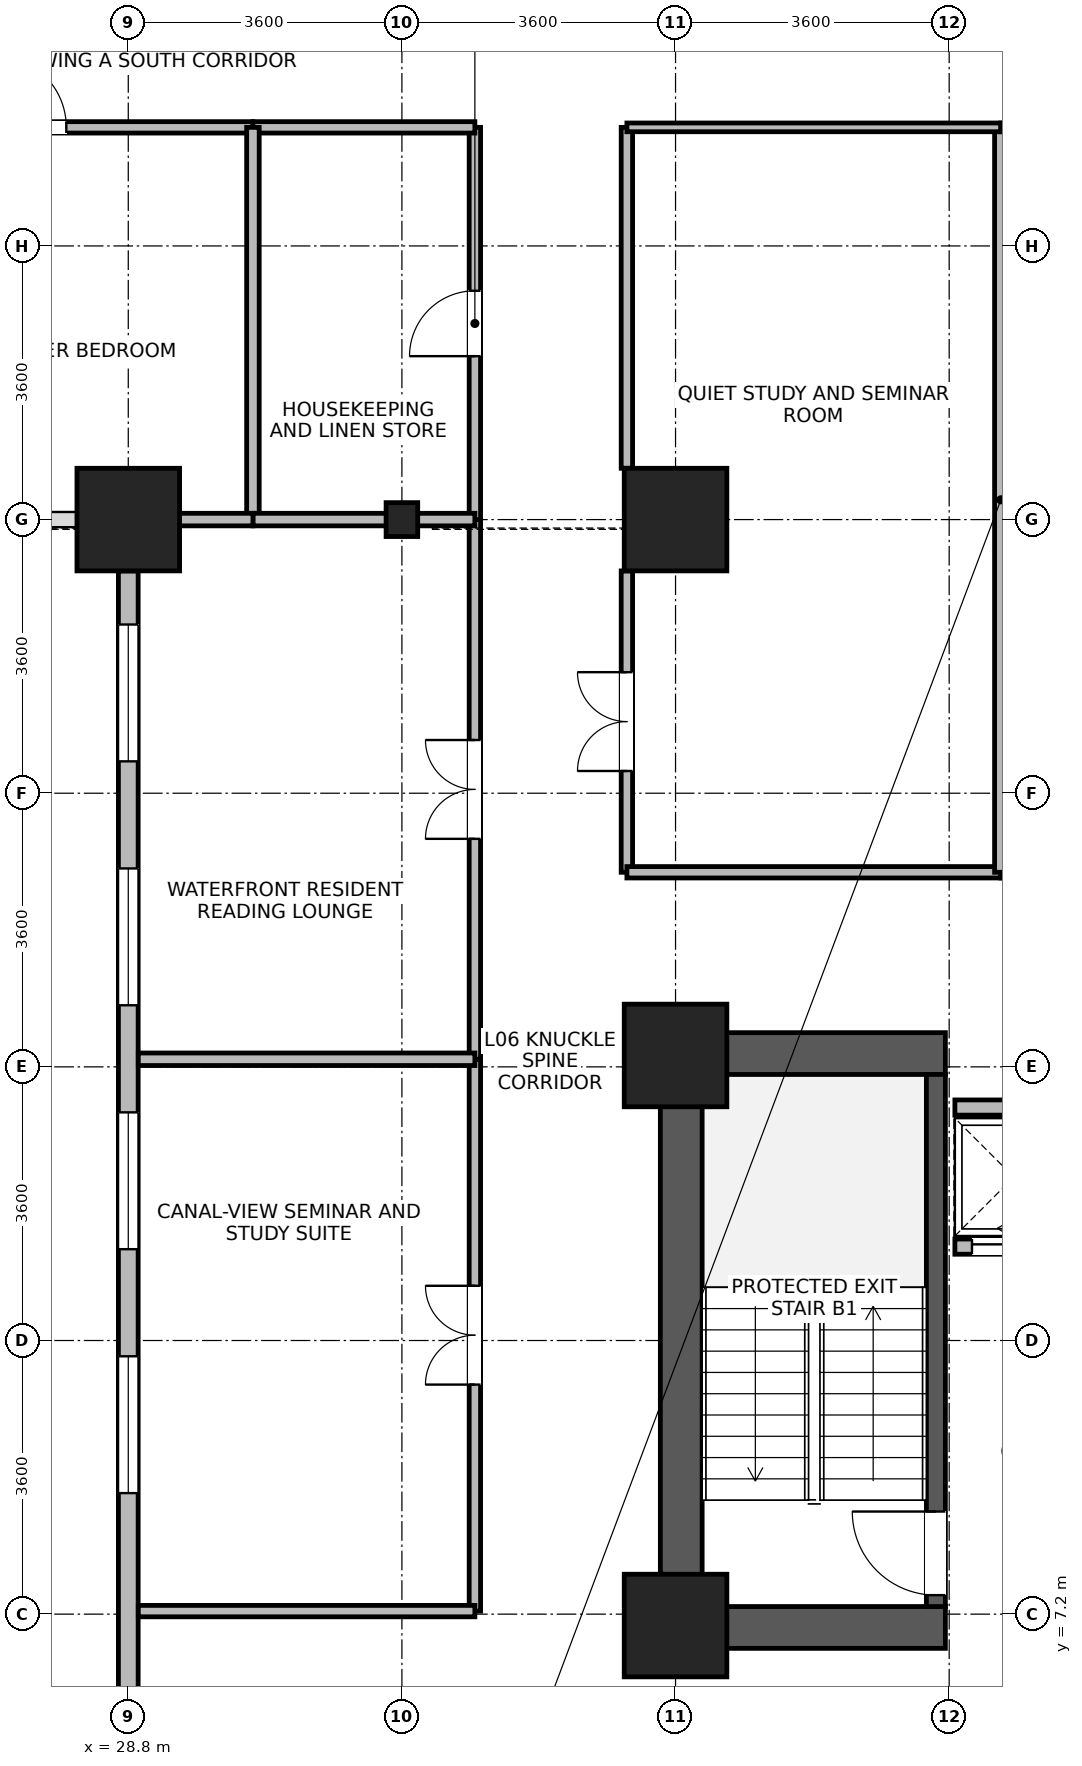
"""IFC4 building model, lengths in metres.
Left out: names, types, materials, properties, quantities, classifications, styles, units other than length and angle.
Written with IfcOpenShell. Run it as: python <this file> out.ifc"""

import sys

from ifc_helpers import new_model, si_unit, direction, frame, frame_2d, origin, origin_2d, place, context, subcontext, project, spatial, rectangle, i_section, extrude, source, transform, mapped, element, fill, save


model = new_model("IFC4")
c1 = context("Model", 3, precision=1e-05, world=origin(), true_north=direction((0.0, 1.0)))
c2 = subcontext(c1, "Body", "Model", "MODEL_VIEW")
j1 = project(units=[si_unit("LENGTHUNIT", "METRE"), si_unit("PLANEANGLEUNIT", "RADIAN")], contexts=[c1])
p1 = place(None, origin())
s1 = spatial("IfcSite", under=j1, at=p1, CompositionType="ELEMENT")
p2 = place(p1, origin())
s2 = spatial("IfcBuilding", under=s1, at=p2, CompositionType="ELEMENT")
p3 = place(p2, frame((0.0, 0.0, 29.0)))
s3 = spatial("IfcBuildingStorey", under=s2, at=p3, CompositionType="ELEMENT", Elevation=29.0)
p4 = place(p3, frame((36.075, 6.75, 0.0), z_axis=(0.0, 0.0, 1.0), x_axis=(0.0, 1.0, 0.0)))
e1 = element("IfcWall", 1, at=p4, inside=s3, PredefinedType="SHEAR", context=c2, shape_type="SweptSolid", body=[
    extrude(rectangle(XDim=8.1, YDim=0.55, at=frame_2d((4.05, 0.0))), origin(), (0.0, 0.0, 1.0), 3.45),
])
for number, where, z_axis, x_axis in (
    (2, (36.35, 7.025, 0.0), (0.0, 0.0, 1.0), (1.0, 0.0, 0.0)),
    (3, (36.35, 14.575, 0.0), (0.0, 0.0, 1.0), (1.0, 0.0, 0.0)),
):
    element("IfcWall", number, at=place(p3, frame(where, z_axis=z_axis, x_axis=x_axis)), inside=s3, PredefinedType="SHEAR", context=c2, shape_type="SweptSolid", body=[
        extrude(rectangle(XDim=3.2, YDim=0.55, at=frame_2d((1.6, 0.0))), origin(), (0.0, 0.0, 1.0), 3.45),
    ])
p5 = place(p3, frame((39.425, 7.3, 0.0), z_axis=(0.0, 0.0, 1.0), x_axis=(0.0, 1.0, 0.0)))
e4 = element("IfcWall", 4, at=p5, inside=s3, PredefinedType="SHEAR", context=c2, shape_type="SweptSolid", body=[
    extrude(rectangle(XDim=7.0, YDim=0.25, at=frame_2d((3.5, 0.0))), origin(), (0.0, 0.0, 1.0), 3.45),
])
p6 = place(p5, frame((0.15, 0.0, 0.0)))
e5 = element("IfcOpeningElement", 5, at=p6, cuts=e4, PredefinedType="OPENING", context=c2, shape_type="SweptSolid", body=[
    extrude(rectangle(XDim=1.1, YDim=2.08, at=frame_2d((0.55, 1.04))), frame((0.0, 0.135, 0.0), z_axis=(0.0, -1.0, 0.0), x_axis=(1.0, 0.0, 0.0)), (0.0, 0.0, 1.0), 0.27),
])
m1 = source(origin(), c2, "Body", "SweptSolid", [
    extrude(rectangle(XDim=1.35, YDim=1.35, at=origin_2d()), origin(), (0.0, 0.0, 1.0), 3.7),
])
for number, where, z_axis, x_axis in (
    (6, (28.8, 21.6, 0.0), (0.0, 0.0, 1.0), (1.0, 0.0, 0.0)),
    (7, (36.0, 21.6, 0.0), (0.0, 0.0, 1.0), (1.0, 0.0, 0.0)),
    (8, (36.0, 7.05, 0.0), (0.0, 0.0, 1.0), (1.0, 0.0, 0.0)),
    (9, (36.0, 14.55, 0.0), (0.0, 0.0, 1.0), (1.0, 0.0, 0.0)),
):
    element("IfcColumn", number, at=place(p3, frame(where, z_axis=z_axis, x_axis=x_axis)), inside=s3, PredefinedType="COLUMN", context=c2, shape_type="MappedRepresentation", body=[
        mapped(m1, transform((0.0, 0.0, 0.0), x_axis=(1.0, 0.0, 0.0), y_axis=(0.0, 1.0, 0.0), z_axis=(0.0, 0.0, 1.0), scale=1.0)),
    ])
m2 = source(origin(), c2, "Body", "SweptSolid", [
    extrude(i_section(OverallWidth=0.416, OverallDepth=0.446, WebThickness=0.029, FlangeThickness=0.04, FilletRadius=0.015, at=origin_2d()), origin(), (0.0, 0.0, 1.0), 3.7),
])
p7 = place(p3, frame((32.4, 21.6, 0.0), z_axis=(0.0, 0.0, 1.0), x_axis=(1.0, 0.0, 0.0)))
e10 = element("IfcColumn", 10, at=p7, inside=s3, PredefinedType="COLUMN", context=c2, shape_type="MappedRepresentation", body=[
    mapped(m2, transform((0.0, 0.0, 0.0), x_axis=(1.0, 0.0, 0.0), y_axis=(0.0, 1.0, 0.0), z_axis=(0.0, 0.0, 1.0), scale=1.0)),
])
p8 = place(p3, frame((28.8, 1.67, 0.0), z_axis=(0.0, 0.0, 1.0), x_axis=(0.0, 1.0, 0.0)))
e11 = element("IfcWall", 11, at=p8, inside=s3, PredefinedType="STANDARD", context=c2, shape_type="SweptSolid", body=[
    extrude(rectangle(XDim=19.254, YDim=0.26, at=frame_2d((9.627, 0.0))), origin(), (0.0, 0.0, 1.0), 3.43),
])
p9 = place(p8, frame((0.705, 0.0, 0.85)))
e12 = element("IfcOpeningElement", 12, at=p9, cuts=e11, PredefinedType="OPENING", context=c2, shape_type="SweptSolid", body=[
    extrude(rectangle(XDim=1.8, YDim=1.85, at=frame_2d((0.9, 0.925))), frame((0.0, 0.14, 0.0), z_axis=(0.0, -1.0, 0.0), x_axis=(1.0, 0.0, 0.0)), (0.0, 0.0, 1.0), 0.28),
])
p10 = place(p8, frame((7.123, 0.0, 0.85)))
e13 = element("IfcOpeningElement", 13, at=p10, cuts=e11, PredefinedType="OPENING", context=c2, shape_type="SweptSolid", body=[
    extrude(rectangle(XDim=1.8, YDim=1.85, at=frame_2d((0.9, 0.925))), frame((0.0, 0.14, 0.0), z_axis=(0.0, -1.0, 0.0), x_axis=(1.0, 0.0, 0.0)), (0.0, 0.0, 1.0), 0.28),
])
p11 = place(p8, frame((10.332, 0.0, 0.85)))
e14 = element("IfcOpeningElement", 14, at=p11, cuts=e11, PredefinedType="OPENING", context=c2, shape_type="SweptSolid", body=[
    extrude(rectangle(XDim=1.8, YDim=1.85, at=frame_2d((0.9, 0.925))), frame((0.0, 0.14, 0.0), z_axis=(0.0, -1.0, 0.0), x_axis=(1.0, 0.0, 0.0)), (0.0, 0.0, 1.0), 0.28),
])
p12 = place(p8, frame((13.541, 0.0, 0.85)))
e15 = element("IfcOpeningElement", 15, at=p12, cuts=e11, PredefinedType="OPENING", context=c2, shape_type="SweptSolid", body=[
    extrude(rectangle(XDim=1.8, YDim=1.85, at=frame_2d((0.9, 0.925))), frame((0.0, 0.14, 0.0), z_axis=(0.0, -1.0, 0.0), x_axis=(1.0, 0.0, 0.0)), (0.0, 0.0, 1.0), 0.28),
])
p13 = place(p8, frame((16.75, 0.0, 0.85)))
e16 = element("IfcOpeningElement", 16, at=p13, cuts=e11, PredefinedType="OPENING", context=c2, shape_type="SweptSolid", body=[
    extrude(rectangle(XDim=1.8, YDim=1.85, at=frame_2d((0.9, 0.925))), frame((0.0, 0.14, 0.0), z_axis=(0.0, -1.0, 0.0), x_axis=(1.0, 0.0, 0.0)), (0.0, 0.0, 1.0), 0.28),
])
p14 = place(p3, frame((39.675, 12.035, 0.0), z_axis=(0.0, 0.0, 1.0), x_axis=(1.0, 0.0, 0.0)))
e17 = element("IfcWall", 17, at=p14, inside=s3, PredefinedType="PARTITIONING", context=c2, shape_type="SweptSolid", body=[
    extrude(rectangle(XDim=1.55, YDim=0.2, at=frame_2d((0.775, 0.0))), origin(), (0.0, 0.0, 1.0), 3.43),
])
p15 = place(p14, frame((0.225, 0.0, 0.0)))
e18 = element("IfcOpeningElement", 18, at=p15, cuts=e17, PredefinedType="OPENING", context=c2, shape_type="SweptSolid", body=[
    extrude(rectangle(XDim=1.1, YDim=2.12, at=frame_2d((0.55, 1.06))), frame((0.0, 0.11, 0.0), z_axis=(0.0, -1.0, 0.0), x_axis=(1.0, 0.0, 0.0)), (0.0, 0.0, 1.0), 0.22),
])
p16 = place(p3, frame((39.675, 13.865, 0.0), z_axis=(0.0, 0.0, 1.0), x_axis=(1.0, 0.0, 0.0)))
e19 = element("IfcWall", 19, at=p16, inside=s3, PredefinedType="PARTITIONING", context=c2, shape_type="SweptSolid", body=[
    extrude(rectangle(XDim=1.55, YDim=0.2, at=frame_2d((0.775, 0.0))), origin(), (0.0, 0.0, 1.0), 3.43),
])
p17 = place(p3, frame((35.36, 16.96, 0.0), z_axis=(0.0, 0.0, 1.0), x_axis=(0.0, 1.0, 0.0)))
e20 = element("IfcWall", 20, at=p17, inside=s3, PredefinedType="PARTITIONING", context=c2, shape_type="SweptSolid", body=[
    extrude(rectangle(XDim=3.965, YDim=0.15, at=frame_2d((1.982, 0.0))), origin(), (0.0, 0.0, 1.0), 3.43),
])
p18 = place(p17, frame((1.333, 0.0, 0.0)))
e21 = element("IfcOpeningElement", 21, at=p18, cuts=e20, PredefinedType="OPENING", context=c2, shape_type="SweptSolid", body=[
    extrude(rectangle(XDim=1.3, YDim=2.12, at=frame_2d((0.65, 1.06))), frame((0.0, 0.085, 0.0), z_axis=(0.0, -1.0, 0.0), x_axis=(1.0, 0.0, 0.0)), (0.0, 0.0, 1.0), 0.17),
])
p19 = place(p3, frame((35.36, 22.275, 0.0), z_axis=(0.0, 0.0, 1.0), x_axis=(0.0, 1.0, 0.0)))
e22 = element("IfcWall", 22, at=p19, inside=s3, PredefinedType="PARTITIONING", context=c2, shape_type="SweptSolid", body=[
    extrude(rectangle(XDim=4.485, YDim=0.15, at=frame_2d((2.243, 0.0))), origin(), (0.0, 0.0, 1.0), 3.43),
])
p20 = place(p3, frame((33.36, 7.24, 0.0), z_axis=(0.0, 0.0, 1.0), x_axis=(0.0, 1.0, 0.0)))
e23 = element("IfcWall", 23, at=p20, inside=s3, PredefinedType="PARTITIONING", context=c2, shape_type="SweptSolid", body=[
    extrude(rectangle(XDim=7.26, YDim=0.15, at=frame_2d((3.63, 0.0))), origin(), (0.0, 0.0, 1.0), 3.43),
])
p21 = place(p20, frame((2.98, 0.0, 0.0)))
e24 = element("IfcOpeningElement", 24, at=p21, cuts=e23, PredefinedType="OPENING", context=c2, shape_type="SweptSolid", body=[
    extrude(rectangle(XDim=1.3, YDim=2.12, at=frame_2d((0.65, 1.06))), frame((0.0, 0.085, 0.0), z_axis=(0.0, -1.0, 0.0), x_axis=(1.0, 0.0, 0.0)), (0.0, 0.0, 1.0), 0.17),
])
p22 = place(p3, frame((33.36, 14.5, 0.0), z_axis=(0.0, 0.0, 1.0), x_axis=(0.0, 1.0, 0.0)))
e25 = element("IfcWall", 25, at=p22, inside=s3, PredefinedType="PARTITIONING", context=c2, shape_type="SweptSolid", body=[
    extrude(rectangle(XDim=7.1, YDim=0.15, at=frame_2d((3.55, 0.0))), origin(), (0.0, 0.0, 1.0), 3.43),
])
p23 = place(p22, frame((2.9, 0.0, 0.0)))
e26 = element("IfcOpeningElement", 26, at=p23, cuts=e25, PredefinedType="OPENING", context=c2, shape_type="SweptSolid", body=[
    extrude(rectangle(XDim=1.3, YDim=2.12, at=frame_2d((0.65, 1.06))), frame((0.0, 0.085, 0.0), z_axis=(0.0, -1.0, 0.0), x_axis=(1.0, 0.0, 0.0)), (0.0, 0.0, 1.0), 0.17),
])
p24 = place(p3, frame((24.58, 26.76, 0.0), z_axis=(0.0, 0.0, 1.0), x_axis=(1.0, 0.0, 0.0)))
e27 = element("IfcWall", 27, at=p24, inside=s3, PredefinedType="PARTITIONING", context=c2, shape_type="SweptSolid", body=[
    extrude(rectangle(XDim=5.86, YDim=0.15, at=frame_2d((2.93, 0.0))), origin(), (0.0, 0.0, 1.0), 3.43),
])
p25 = place(p24, frame((2.455, 0.0, 0.0)))
e28 = element("IfcOpeningElement", 28, at=p25, cuts=e27, PredefinedType="OPENING", context=c2, shape_type="SweptSolid", body=[
    extrude(rectangle(XDim=0.95, YDim=2.1, at=frame_2d((0.475, 1.05))), frame((0.0, 0.085, 0.0), z_axis=(0.0, -1.0, 0.0), x_axis=(1.0, 0.0, 0.0)), (0.0, 0.0, 1.0), 0.17),
])
p26 = place(p3, frame((33.36, 21.6, 0.0), z_axis=(0.0, 0.0, 1.0), x_axis=(0.0, 1.0, 0.0)))
e29 = element("IfcWall", 29, at=p26, inside=s3, PredefinedType="PARTITIONING", context=c2, shape_type="SweptSolid", body=[
    extrude(rectangle(XDim=5.16, YDim=0.15, at=frame_2d((2.58, 0.0))), origin(), (0.0, 0.0, 1.0), 3.43),
])
p27 = place(p26, frame((2.15, 0.0, 0.0)))
e30 = element("IfcOpeningElement", 30, at=p27, cuts=e29, PredefinedType="OPENING", context=c2, shape_type="SweptSolid", body=[
    extrude(rectangle(XDim=0.86, YDim=2.02, at=frame_2d((0.43, 1.01))), frame((0.0, 0.085, 0.0), z_axis=(0.0, -1.0, 0.0), x_axis=(1.0, 0.0, 0.0)), (0.0, 0.0, 1.0), 0.17),
])
p28 = place(p3, frame((35.36, 16.96, 0.0), z_axis=(0.0, 0.0, 1.0), x_axis=(1.0, 0.0, 0.0)))
e31 = element("IfcWall", 31, at=p28, inside=s3, PredefinedType="PARTITIONING", context=c2, shape_type="SweptSolid", body=[
    extrude(rectangle(XDim=4.92, YDim=0.15, at=frame_2d((2.46, 0.0))), origin(), (0.0, 0.0, 1.0), 3.43),
])
p29 = place(p3, frame((28.932, 7.24, 0.0), z_axis=(0.0, 0.0, 1.0), x_axis=(1.0, 0.0, 0.0)))
e32 = element("IfcWall", 32, at=p29, inside=s3, PredefinedType="PARTITIONING", context=c2, shape_type="SweptSolid", body=[
    extrude(rectangle(XDim=4.428, YDim=0.15, at=frame_2d((2.214, 0.0))), origin(), (0.0, 0.0, 1.0), 3.43),
])
p30 = place(p3, frame((40.28, 16.96, 0.0), z_axis=(0.0, 0.0, 1.0), x_axis=(1.0, 0.0, 0.0)))
e33 = element("IfcWall", 33, at=p30, inside=s3, PredefinedType="PARTITIONING", context=c2, shape_type="SweptSolid", body=[
    extrude(rectangle(XDim=3.32, YDim=0.15, at=frame_2d((1.66, 0.0))), origin(), (0.0, 0.0, 1.0), 3.43),
])
p31 = place(p30, frame((1.01, 0.0, 0.0)))
e34 = element("IfcOpeningElement", 34, at=p31, cuts=e33, PredefinedType="OPENING", context=c2, shape_type="SweptSolid", body=[
    extrude(rectangle(XDim=1.3, YDim=2.12, at=frame_2d((0.65, 1.06))), frame((0.0, 0.085, 0.0), z_axis=(0.0, -1.0, 0.0), x_axis=(1.0, 0.0, 0.0)), (0.0, 0.0, 1.0), 0.17),
])
p32 = place(p3, frame((30.44, 26.76, 0.0), z_axis=(0.0, 0.0, 1.0), x_axis=(1.0, 0.0, 0.0)))
e35 = element("IfcWall", 35, at=p32, inside=s3, PredefinedType="PARTITIONING", context=c2, shape_type="SweptSolid", body=[
    extrude(rectangle(XDim=2.92, YDim=0.15, at=frame_2d((1.46, 0.0))), origin(), (0.0, 0.0, 1.0), 3.43),
])
p33 = place(p3, frame((40.28, 16.96, 0.0), z_axis=(0.0, 0.0, 1.0), x_axis=(0.0, 1.0, 0.0)))
e36 = element("IfcWall", 36, at=p33, inside=s3, PredefinedType="PARTITIONING", context=c2, shape_type="SweptSolid", body=[
    extrude(rectangle(XDim=9.8, YDim=0.165, at=frame_2d((4.9, 0.0))), origin(), (0.0, 0.0, 1.0), 3.43),
])
p34 = place(p3, frame((30.44, 21.6, 0.0), z_axis=(0.0, 0.0, 1.0), x_axis=(0.0, 1.0, 0.0)))
e37 = element("IfcWall", 37, at=p34, inside=s3, PredefinedType="PARTITIONING", context=c2, shape_type="SweptSolid", body=[
    extrude(rectangle(XDim=5.16, YDim=0.165, at=frame_2d((2.58, 0.0))), origin(), (0.0, 0.0, 1.0), 3.43),
])
p35 = place(p3, frame((35.36, 26.76, 0.0), z_axis=(0.0, 0.0, 1.0), x_axis=(1.0, 0.0, 0.0)))
e38 = element("IfcWall", 38, at=p35, inside=s3, PredefinedType="PARTITIONING", context=c2, shape_type="SweptSolid", body=[
    extrude(rectangle(XDim=4.92, YDim=0.115, at=frame_2d((2.46, 0.0))), origin(), (0.0, 0.0, 1.0), 3.43),
])
p36 = place(p3, frame((28.932, 14.5, 0.0), z_axis=(0.0, 0.0, 1.0), x_axis=(1.0, 0.0, 0.0)))
e39 = element("IfcWall", 39, at=p36, inside=s3, PredefinedType="PARTITIONING", context=c2, shape_type="SweptSolid", body=[
    extrude(rectangle(XDim=4.428, YDim=0.165, at=frame_2d((2.214, 0.0))), origin(), (0.0, 0.0, 1.0), 3.43),
])
p37 = place(p3, frame((40.28, 26.76, 0.0), z_axis=(0.0, 0.0, 1.0), x_axis=(1.0, 0.0, 0.0)))
e40 = element("IfcWall", 40, at=p37, inside=s3, PredefinedType="PARTITIONING", context=c2, shape_type="SweptSolid", body=[
    extrude(rectangle(XDim=3.32, YDim=0.115, at=frame_2d((1.66, 0.0))), origin(), (0.0, 0.0, 1.0), 3.43),
])
p38 = place(p3, frame((30.44, 21.6, 0.0), z_axis=(0.0, 0.0, 1.0), x_axis=(1.0, 0.0, 0.0)))
e41 = element("IfcWall", 41, at=p38, inside=s3, PredefinedType="PARTITIONING", context=c2, shape_type="SweptSolid", body=[
    extrude(rectangle(XDim=2.92, YDim=0.165, at=frame_2d((1.46, 0.0))), origin(), (0.0, 0.0, 1.0), 2.93),
])
p39 = place(p3, frame((28.932, 21.6, 0.0), z_axis=(0.0, 0.0, 1.0), x_axis=(1.0, 0.0, 0.0)))
e42 = element("IfcWall", 42, at=p39, inside=s3, PredefinedType="PARTITIONING", context=c2, shape_type="SweptSolid", body=[
    extrude(rectangle(XDim=1.508, YDim=0.165, at=frame_2d((0.754, 0.0))), origin(), (0.0, 0.0, 1.0), 2.93),
])
p40 = place(p10, origin())
e43 = element("IfcWindow", 43, at=p40, inside=s3, PartitioningType="SINGLE_PANEL", PredefinedType="WINDOW", context=c2, shape_type="SweptSolid", body=[
    extrude(rectangle(XDim=1.8, YDim=1.85, at=frame_2d((0.9, 0.925))), frame((0.0, 0.03, 0.0), z_axis=(0.0, -1.0, 0.0), x_axis=(1.0, 0.0, 0.0)), (0.0, 0.0, 1.0), 0.06),
])
fill(e13, e43)
p41 = place(p11, origin())
e44 = element("IfcWindow", 44, at=p41, inside=s3, PartitioningType="SINGLE_PANEL", PredefinedType="WINDOW", context=c2, shape_type="SweptSolid", body=[
    extrude(rectangle(XDim=1.8, YDim=1.85, at=frame_2d((0.9, 0.925))), frame((0.0, 0.03, 0.0), z_axis=(0.0, -1.0, 0.0), x_axis=(1.0, 0.0, 0.0)), (0.0, 0.0, 1.0), 0.06),
])
fill(e14, e44)
p42 = place(p12, origin())
e45 = element("IfcWindow", 45, at=p42, inside=s3, PartitioningType="SINGLE_PANEL", PredefinedType="WINDOW", context=c2, shape_type="SweptSolid", body=[
    extrude(rectangle(XDim=1.8, YDim=1.85, at=frame_2d((0.9, 0.925))), frame((0.0, 0.03, 0.0), z_axis=(0.0, -1.0, 0.0), x_axis=(1.0, 0.0, 0.0)), (0.0, 0.0, 1.0), 0.06),
])
fill(e15, e45)
p43 = place(p13, origin())
e46 = element("IfcWindow", 46, at=p43, inside=s3, PartitioningType="SINGLE_PANEL", PredefinedType="WINDOW", context=c2, shape_type="SweptSolid", body=[
    extrude(rectangle(XDim=1.8, YDim=1.85, at=frame_2d((0.9, 0.925))), frame((0.0, 0.03, 0.0), z_axis=(0.0, -1.0, 0.0), x_axis=(1.0, 0.0, 0.0)), (0.0, 0.0, 1.0), 0.06),
])
fill(e16, e46)
p44 = place(p6, origin())
e47 = element("IfcDoor", 47, at=p44, inside=s3, OperationType="SINGLE_SWING_RIGHT", PredefinedType="DOOR", context=c2, shape_type="SweptSolid", body=[
    extrude(rectangle(XDim=1.1, YDim=2.08, at=frame_2d((0.55, 1.04))), frame((0.0, 0.025, 0.0), z_axis=(0.0, -1.0, 0.0), x_axis=(1.0, 0.0, 0.0)), (0.0, 0.0, 1.0), 0.05),
])
fill(e5, e47)
p45 = place(p15, origin())
e48 = element("IfcDoor", 48, at=p45, inside=s3, OperationType="SLIDING_TO_LEFT", PredefinedType="DOOR", context=c2, shape_type="SweptSolid", body=[
    extrude(rectangle(XDim=1.1, YDim=2.12, at=frame_2d((0.55, 1.06))), frame((0.0, 0.025, 0.0), z_axis=(0.0, -1.0, 0.0), x_axis=(1.0, 0.0, 0.0)), (0.0, 0.0, 1.0), 0.05),
])
fill(e18, e48)
p46 = place(p18, origin())
e49 = element("IfcDoor", 49, at=p46, inside=s3, OperationType="DOUBLE_DOOR_SINGLE_SWING", PredefinedType="DOOR", context=c2, shape_type="SweptSolid", body=[
    extrude(rectangle(XDim=1.3, YDim=2.12, at=frame_2d((0.65, 1.06))), frame((0.0, 0.025, 0.0), z_axis=(0.0, -1.0, 0.0), x_axis=(1.0, 0.0, 0.0)), (0.0, 0.0, 1.0), 0.05),
])
fill(e21, e49)
p47 = place(p21, origin())
e50 = element("IfcDoor", 50, at=p47, inside=s3, OperationType="DOUBLE_DOOR_SINGLE_SWING", PredefinedType="DOOR", context=c2, shape_type="SweptSolid", body=[
    extrude(rectangle(XDim=1.3, YDim=2.12, at=frame_2d((0.65, 1.06))), frame((0.0, 0.025, 0.0), z_axis=(0.0, -1.0, 0.0), x_axis=(1.0, 0.0, 0.0)), (0.0, 0.0, 1.0), 0.05),
])
fill(e24, e50)
p48 = place(p23, origin())
e51 = element("IfcDoor", 51, at=p48, inside=s3, OperationType="DOUBLE_DOOR_SINGLE_SWING", PredefinedType="DOOR", context=c2, shape_type="SweptSolid", body=[
    extrude(rectangle(XDim=1.3, YDim=2.12, at=frame_2d((0.65, 1.06))), frame((0.0, 0.025, 0.0), z_axis=(0.0, -1.0, 0.0), x_axis=(1.0, 0.0, 0.0)), (0.0, 0.0, 1.0), 0.05),
])
fill(e26, e51)
p49 = place(p25, origin())
e52 = element("IfcDoor", 52, at=p49, inside=s3, OperationType="SINGLE_SWING_LEFT", PredefinedType="DOOR", context=c2, shape_type="SweptSolid", body=[
    extrude(rectangle(XDim=0.95, YDim=2.1, at=frame_2d((0.475, 1.05))), frame((0.0, 0.025, 0.0), z_axis=(0.0, -1.0, 0.0), x_axis=(1.0, 0.0, 0.0)), (0.0, 0.0, 1.0), 0.05),
])
fill(e28, e52)
p50 = place(p27, origin())
e53 = element("IfcDoor", 53, at=p50, inside=s3, OperationType="SINGLE_SWING_LEFT", PredefinedType="DOOR", context=c2, shape_type="SweptSolid", body=[
    extrude(rectangle(XDim=0.86, YDim=2.02, at=frame_2d((0.43, 1.01))), frame((0.0, 0.025, 0.0), z_axis=(0.0, -1.0, 0.0), x_axis=(1.0, 0.0, 0.0)), (0.0, 0.0, 1.0), 0.05),
])
fill(e30, e53)
save(model, sys.argv[1])
